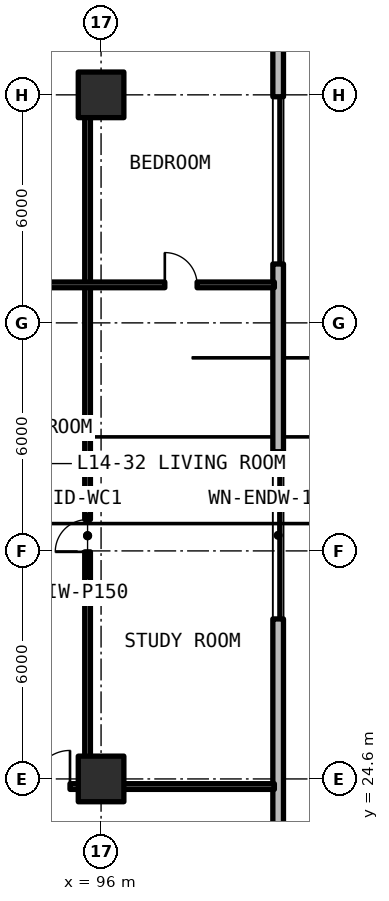
"""IFC4 building model, lengths in metres.
Left out: names, types, materials, properties, quantities, classifications, styles, units other than length and angle.
Written with IfcOpenShell. Run it as: python <this file> out.ifc"""

import sys

from ifc_helpers import new_model, si_unit, direction, frame, frame_2d, origin, origin_2d, place, context, subcontext, project, spatial, rectangle, extrude, element, fill, save


model = new_model("IFC4")
c1 = context("Model", 3, precision=1e-05, world=origin(), true_north=direction((0.0, 1.0)))
c2 = subcontext(c1, "Body", "Model", "MODEL_VIEW")
j1 = project(units=[si_unit("LENGTHUNIT", "METRE"), si_unit("PLANEANGLEUNIT", "RADIAN")], contexts=[c1])
p1 = place(None, origin())
s1 = spatial("IfcSite", under=j1, at=p1, CompositionType="ELEMENT")
p2 = place(p1, origin())
s2 = spatial("IfcBuilding", under=s1, at=p2, CompositionType="ELEMENT")
p3 = place(p2, frame((0.0, 0.0, 52.14)))
s3 = spatial("IfcBuildingStorey", under=s2, at=p3, CompositionType="ELEMENT", Elevation=52.14)
for number, where, z_axis, x_axis in (
    (1, (96.0, 24.6, 0.0), (0.0, 0.0, 1.0), (1.0, 0.0, 0.0)),
    (2, (96.0, 42.6, 0.0), (0.0, 0.0, 1.0), (1.0, 0.0, 0.0)),
):
    element("IfcColumn", number, at=place(p3, frame(where, z_axis=z_axis, x_axis=x_axis)), inside=s3, PredefinedType="COLUMN", context=c2, shape_type="SweptSolid", body=[
        extrude(rectangle(XDim=1.2, YDim=1.2, at=origin_2d()), origin(), (0.0, 0.0, 1.0), 3.3),
    ])
p4 = place(p3, frame((100.66, 11.858, 0.0), z_axis=(0.0, 0.0, 1.0), x_axis=(0.0, 1.0, 0.0)))
e3 = element("IfcWall", 3, at=p4, inside=s3, PredefinedType="SOLIDWALL", context=c2, shape_type="SweptSolid", body=[
    extrude(rectangle(XDim=43.484, YDim=0.28, at=frame_2d((21.742, 0.0))), origin(), (0.0, 0.0, 1.0), 3.08),
])
p5 = place(p4, frame((38.942, 0.0, 0.0)))
e4 = element("IfcOpeningElement", 4, at=p5, cuts=e3, PredefinedType="OPENING", context=c2, shape_type="SweptSolid", body=[
    extrude(rectangle(XDim=1.1, YDim=2.15, at=frame_2d((0.55, 1.075))), frame((0.0, 0.15, 0.0), z_axis=(0.0, -1.0, 0.0), x_axis=(1.0, 0.0, 0.0)), (0.0, 0.0, 1.0), 0.3),
])
p6 = place(p4, frame((16.952, 0.0, 0.78)))
e5 = element("IfcOpeningElement", 5, at=p6, cuts=e3, PredefinedType="OPENING", context=c2, shape_type="SweptSolid", body=[
    extrude(rectangle(XDim=4.4, YDim=1.66, at=frame_2d((2.2, 0.83))), frame((0.0, 0.15, 0.0), z_axis=(0.0, -1.0, 0.0), x_axis=(1.0, 0.0, 0.0)), (0.0, 0.0, 1.0), 0.3),
])
p7 = place(p4, frame((26.292, 0.0, 0.78)))
e6 = element("IfcOpeningElement", 6, at=p7, cuts=e3, PredefinedType="OPENING", context=c2, shape_type="SweptSolid", body=[
    extrude(rectangle(XDim=4.4, YDim=1.66, at=frame_2d((2.2, 0.83))), frame((0.0, 0.15, 0.0), z_axis=(0.0, -1.0, 0.0), x_axis=(1.0, 0.0, 0.0)), (0.0, 0.0, 1.0), 0.3),
])
p8 = place(p4, frame((1.511, 0.0, 0.78)))
e7 = element("IfcOpeningElement", 7, at=p8, cuts=e3, PredefinedType="OPENING", context=c2, shape_type="SweptSolid", body=[
    extrude(rectangle(XDim=4.4, YDim=1.66, at=frame_2d((2.2, 0.83))), frame((0.0, 0.15, 0.0), z_axis=(0.0, -1.0, 0.0), x_axis=(1.0, 0.0, 0.0)), (0.0, 0.0, 1.0), 0.3),
])
p9 = place(p3, frame((95.645, 24.4, 0.0), z_axis=(0.0, 0.0, 1.0), x_axis=(0.0, 1.0, 0.0)))
e8 = element("IfcWall", 8, at=p9, inside=s3, PredefinedType="PARTITIONING", context=c2, shape_type="SweptSolid", body=[
    extrude(rectangle(XDim=13.2, YDim=0.15, at=frame_2d((6.6, 0.0))), origin(), (0.0, 0.0, 1.0), 2.35),
])
p10 = place(p9, frame((6.175, 0.0, 0.0)))
e9 = element("IfcOpeningElement", 9, at=p10, cuts=e8, PredefinedType="OPENING", context=c2, shape_type="SweptSolid", body=[
    extrude(rectangle(XDim=0.85, YDim=2.1, at=frame_2d((0.425, 1.05))), frame((0.0, 0.085, 0.0), z_axis=(0.0, -1.0, 0.0), x_axis=(1.0, 0.0, 0.0)), (0.0, 0.0, 1.0), 0.17),
])
p11 = place(p3, frame((95.645, 37.6, 0.0), z_axis=(0.0, 0.0, 1.0), x_axis=(0.0, 1.0, 0.0)))
e10 = element("IfcWall", 10, at=p11, inside=s3, PredefinedType="PARTITIONING", context=c2, shape_type="SweptSolid", body=[
    extrude(rectangle(XDim=5.2, YDim=0.15, at=frame_2d((2.6, 0.0))), origin(), (0.0, 0.0, 1.0), 2.35),
])
p12 = place(p3, frame((90.32, 37.6, 0.0), z_axis=(0.0, 0.0, 1.0), x_axis=(1.0, 0.0, 0.0)))
e11 = element("IfcWall", 11, at=p12, inside=s3, PredefinedType="PARTITIONING", context=c2, shape_type="SweptSolid", body=[
    extrude(rectangle(XDim=10.24, YDim=0.15, at=frame_2d((5.12, 0.0))), origin(), (0.0, 0.0, 1.0), 2.35),
])
p13 = place(p12, frame((3.412, 0.0, 0.0)))
e12 = element("IfcOpeningElement", 12, at=p13, cuts=e11, PredefinedType="OPENING", context=c2, shape_type="SweptSolid", body=[
    extrude(rectangle(XDim=0.85, YDim=2.1, at=frame_2d((0.425, 1.05))), frame((0.0, 0.085, 0.0), z_axis=(0.0, -1.0, 0.0), x_axis=(1.0, 0.0, 0.0)), (0.0, 0.0, 1.0), 0.17),
])
p14 = place(p12, frame((7.357, 0.0, 0.0)))
e13 = element("IfcOpeningElement", 13, at=p14, cuts=e11, PredefinedType="OPENING", context=c2, shape_type="SweptSolid", body=[
    extrude(rectangle(XDim=0.85, YDim=2.1, at=frame_2d((0.425, 1.05))), frame((0.0, 0.085, 0.0), z_axis=(0.0, -1.0, 0.0), x_axis=(1.0, 0.0, 0.0)), (0.0, 0.0, 1.0), 0.17),
])
p15 = place(p3, frame((90.32, 24.4, 0.0), z_axis=(0.0, 0.0, 1.0), x_axis=(1.0, 0.0, 0.0)))
e14 = element("IfcWall", 14, at=p15, inside=s3, PredefinedType="SOLIDWALL", context=c2, shape_type="SweptSolid", body=[
    extrude(rectangle(XDim=10.24, YDim=0.15, at=frame_2d((5.12, 0.0))), origin(), (0.0, 0.0, 1.0), 2.295),
])
p16 = place(p15, frame((3.913, 0.0, 0.0)))
e15 = element("IfcOpeningElement", 15, at=p16, cuts=e14, PredefinedType="OPENING", context=c2, shape_type="SweptSolid", body=[
    extrude(rectangle(XDim=0.95, YDim=2.15, at=frame_2d((0.475, 1.075))), frame((0.0, 0.085, 0.0), z_axis=(0.0, -1.0, 0.0), x_axis=(1.0, 0.0, 0.0)), (0.0, 0.0, 1.0), 0.17),
])
p17 = place(p6, origin())
e16 = element("IfcWindow", 16, at=p17, inside=s3, PartitioningType="SINGLE_PANEL", PredefinedType="WINDOW", context=c2, shape_type="SweptSolid", body=[
    extrude(rectangle(XDim=4.4, YDim=1.66, at=frame_2d((2.2, 0.83))), frame((0.0, 0.03, 0.0), z_axis=(0.0, -1.0, 0.0), x_axis=(1.0, 0.0, 0.0)), (0.0, 0.0, 1.0), 0.06),
])
fill(e5, e16)
p18 = place(p7, origin())
e17 = element("IfcWindow", 17, at=p18, inside=s3, PartitioningType="SINGLE_PANEL", PredefinedType="WINDOW", context=c2, shape_type="SweptSolid", body=[
    extrude(rectangle(XDim=4.4, YDim=1.66, at=frame_2d((2.2, 0.83))), frame((0.0, 0.03, 0.0), z_axis=(0.0, -1.0, 0.0), x_axis=(1.0, 0.0, 0.0)), (0.0, 0.0, 1.0), 0.06),
])
fill(e6, e17)
p19 = place(p10, origin())
e18 = element("IfcDoor", 18, at=p19, inside=s3, OperationType="SINGLE_SWING_LEFT", PredefinedType="DOOR", context=c2, shape_type="SweptSolid", body=[
    extrude(rectangle(XDim=0.85, YDim=2.1, at=frame_2d((0.425, 1.05))), frame((0.0, 0.025, 0.0), z_axis=(0.0, -1.0, 0.0), x_axis=(1.0, 0.0, 0.0)), (0.0, 0.0, 1.0), 0.05),
])
fill(e9, e18)
p20 = place(p14, origin())
e19 = element("IfcDoor", 19, at=p20, inside=s3, OperationType="SINGLE_SWING_LEFT", PredefinedType="DOOR", context=c2, shape_type="SweptSolid", body=[
    extrude(rectangle(XDim=0.85, YDim=2.1, at=frame_2d((0.425, 1.05))), frame((0.0, 0.025, 0.0), z_axis=(0.0, -1.0, 0.0), x_axis=(1.0, 0.0, 0.0)), (0.0, 0.0, 1.0), 0.05),
])
fill(e13, e19)
p21 = place(p16, origin())
e20 = element("IfcDoor", 20, at=p21, inside=s3, OperationType="SINGLE_SWING_RIGHT", PredefinedType="DOOR", context=c2, shape_type="SweptSolid", body=[
    extrude(rectangle(XDim=0.95, YDim=2.15, at=frame_2d((0.475, 1.075))), frame((0.0, 0.025, 0.0), z_axis=(0.0, -1.0, 0.0), x_axis=(1.0, 0.0, 0.0)), (0.0, 0.0, 1.0), 0.05),
])
fill(e15, e20)
save(model, sys.argv[1])
